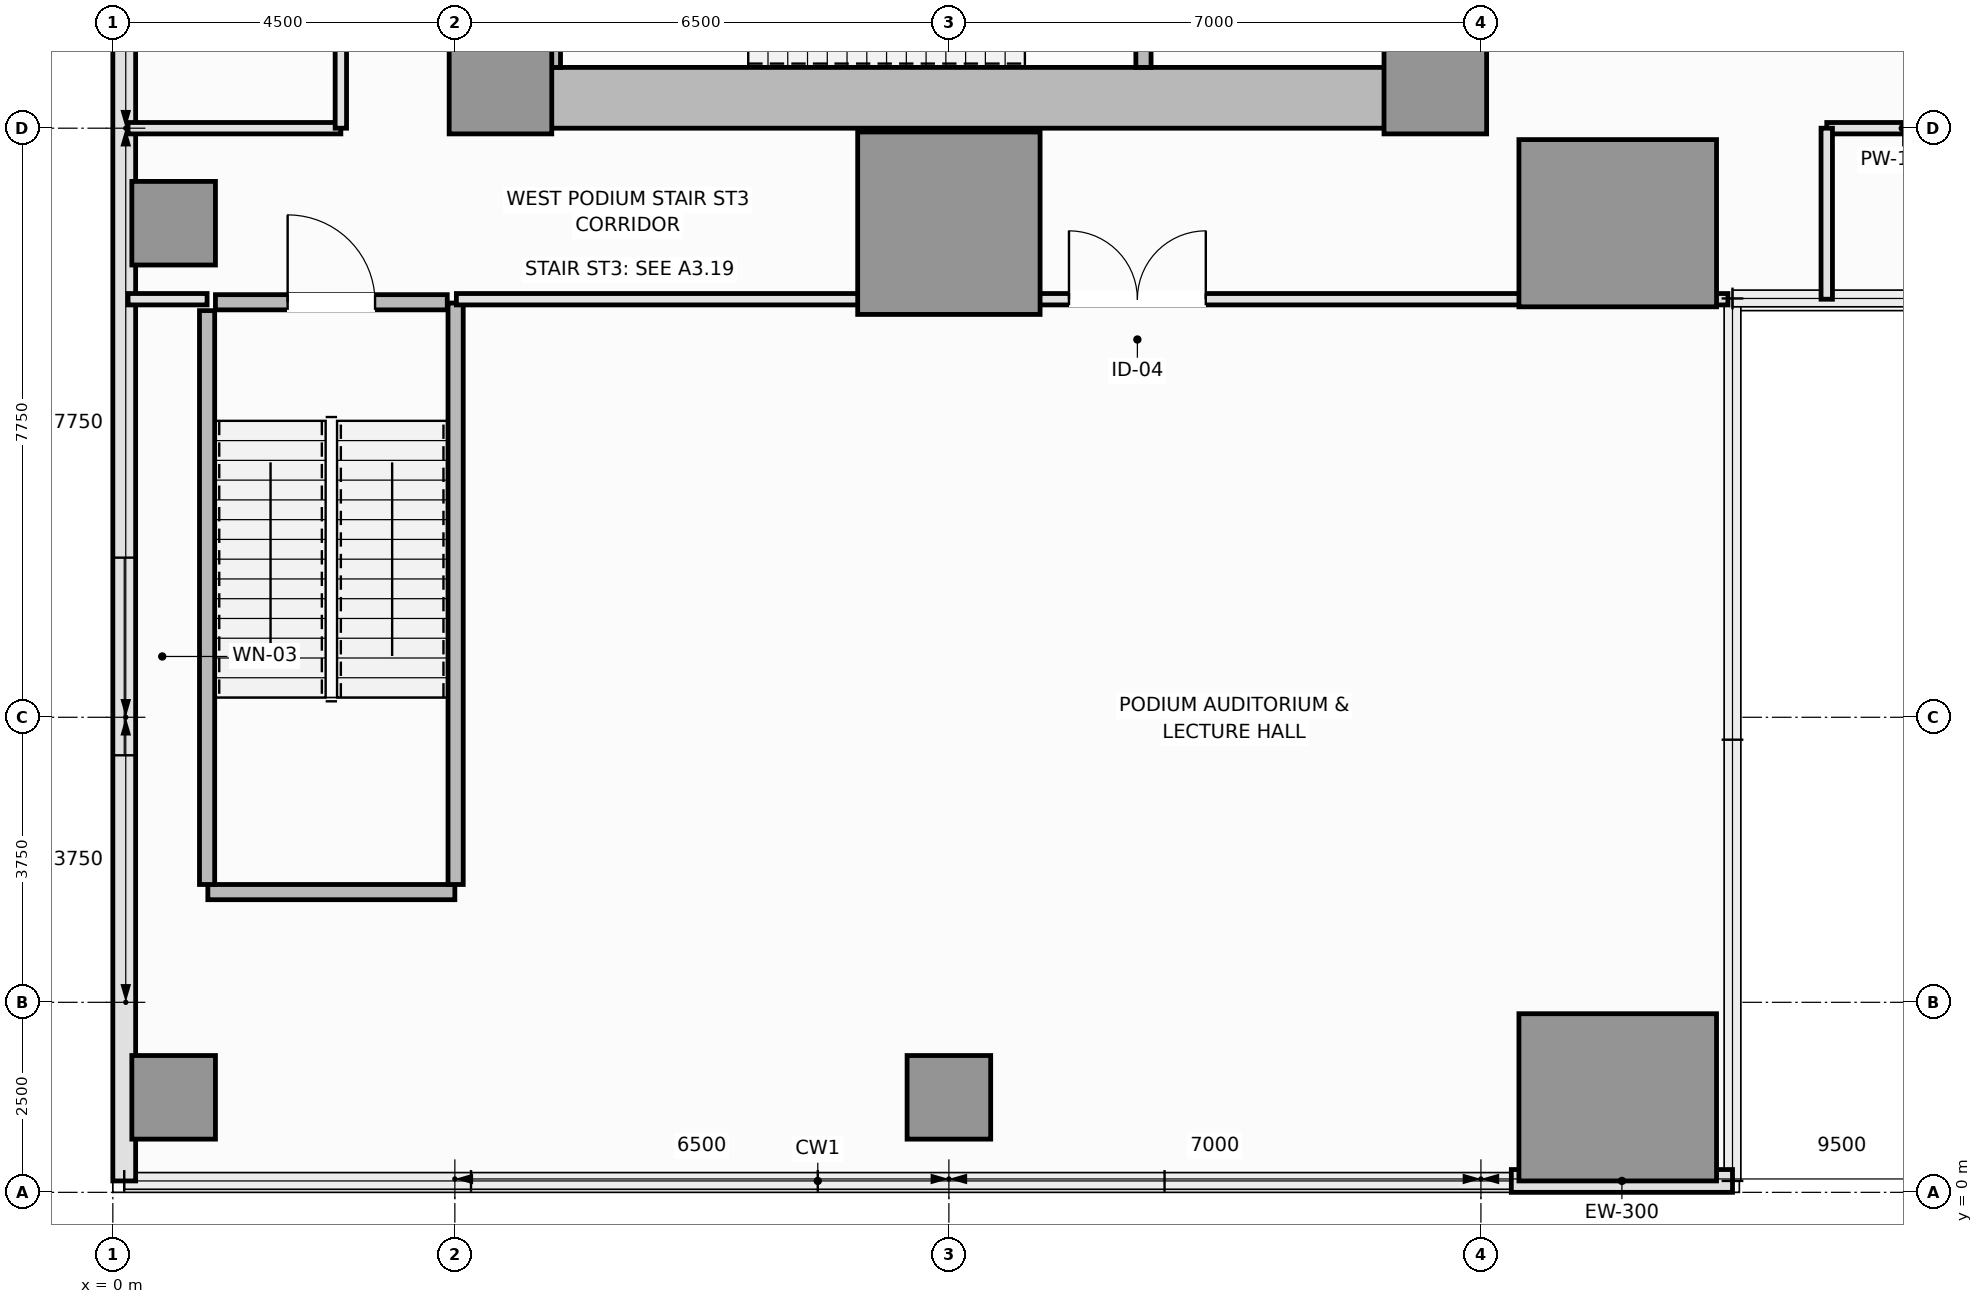
"""IFC4 building model, lengths in metres.
Left out: names, types, materials, properties, quantities, classifications, styles, units other than length and angle.
Written with IfcOpenShell. Run it as: python <this file> out.ifc"""

import sys

from ifc_helpers import new_model, si_unit, direction, frame, frame_2d, origin, origin_2d, place, context, subcontext, project, spatial, rectangle, extrude, element, fill, save


model = new_model("IFC4")
c1 = context("Model", 3, precision=1e-05, world=origin(), true_north=direction((0.0, 1.0)))
c2 = subcontext(c1, "Body", "Model", "MODEL_VIEW")
j1 = project(units=[si_unit("LENGTHUNIT", "METRE"), si_unit("PLANEANGLEUNIT", "RADIAN")], contexts=[c1])
p1 = place(None, origin())
s1 = spatial("IfcSite", under=j1, at=p1, CompositionType="ELEMENT")
p2 = place(p1, origin())
s2 = spatial("IfcBuilding", under=s1, at=p2, CompositionType="ELEMENT")
p3 = place(p2, frame((0.0, 0.0, 10.8)))
s3 = spatial("IfcBuildingStorey", under=s2, at=p3, CompositionType="ELEMENT", Elevation=10.8)
p4 = place(p3, frame((4.5, 14.4, 0.0), z_axis=(0.0, 0.0, 1.0), x_axis=(1.0, 0.0, 0.0)))
e1 = element("IfcWall", 1, at=p4, inside=s3, PredefinedType="SHEAR", context=c2, shape_type="SweptSolid", body=[
    extrude(rectangle(XDim=13.5, YDim=0.8, at=frame_2d((6.75, 0.0))), origin(), (0.0, 0.0, 1.0), 4.8),
])
p5 = place(p3, frame((4.9, 14.8, 0.0), z_axis=(0.0, 0.0, 1.0), x_axis=(0.0, 1.0, 0.0)))
e2 = element("IfcWall", 2, at=p5, inside=s3, PredefinedType="SHEAR", context=c2, shape_type="SweptSolid", body=[
    extrude(rectangle(XDim=20.9, YDim=0.8, at=frame_2d((10.45, 0.0))), origin(), (0.0, 0.0, 1.0), 4.8),
])
p6 = place(p3, frame((17.6, 14.8, 0.0), z_axis=(0.0, 0.0, 1.0), x_axis=(0.0, 1.0, 0.0)))
e3 = element("IfcWall", 3, at=p6, inside=s3, PredefinedType="SHEAR", context=c2, shape_type="SweptSolid", body=[
    extrude(rectangle(XDim=8.65, YDim=0.8, at=frame_2d((4.325, 0.0))), origin(), (0.0, 0.0, 1.0), 4.8),
])
p7 = place(p6, frame((4.1, 0.0, 0.0)))
e4 = element("IfcOpeningElement", 4, at=p7, cuts=e3, PredefinedType="OPENING", context=c2, shape_type="SweptSolid", body=[
    extrude(rectangle(XDim=1.1, YDim=2.15, at=frame_2d((0.55, 1.075))), frame((0.0, 0.41, 0.0), z_axis=(0.0, -1.0, 0.0), x_axis=(1.0, 0.0, 0.0)), (0.0, 0.0, 1.0), 0.82),
])
for number, where, z_axis, x_axis in (
    (5, (5.1, 14.6, 0.0), (0.0, 0.0, 1.0), (1.0, 0.0, 0.0)),
    (6, (17.4, 14.6, 0.0), (0.0, 0.0, 1.0), (1.0, 0.0, 0.0)),
):
    element("IfcColumn", number, at=place(p3, frame(where, z_axis=z_axis, x_axis=x_axis)), inside=s3, PredefinedType="PILASTER", context=c2, shape_type="SweptSolid", body=[
        extrude(rectangle(XDim=1.35, YDim=1.35, at=origin_2d()), origin(), (0.0, 0.0, 1.0), 4.8),
    ])
p8 = place(p3, frame((11.0, 12.75, 0.0), z_axis=(0.0, 0.0, 1.0), x_axis=(1.0, 0.0, 0.0)))
e7 = element("IfcColumn", 7, at=p8, inside=s3, PredefinedType="COLUMN", context=c2, shape_type="SweptSolid", body=[
    extrude(rectangle(XDim=2.4, YDim=2.4, at=origin_2d()), origin(), (0.0, 0.0, 1.0), 4.8),
])
for number, where, z_axis, x_axis in (
    (8, (19.8, 1.25, 0.0), (0.0, 0.0, 1.0), (1.0, 0.0, 0.0)),
    (9, (19.8, 12.75, 0.0), (0.0, 0.0, 1.0), (1.0, 0.0, 0.0)),
):
    element("IfcColumn", number, at=place(p3, frame(where, z_axis=z_axis, x_axis=x_axis)), inside=s3, PredefinedType="COLUMN", context=c2, shape_type="SweptSolid", body=[
        extrude(rectangle(XDim=2.6, YDim=2.2, at=origin_2d()), origin(), (0.0, 0.0, 1.0), 4.8),
    ])
for number, where, z_axis, x_axis in (
    (10, (0.8, 1.25, 0.0), (0.0, 0.0, 1.0), (1.0, 0.0, 0.0)),
    (11, (0.8, 12.75, 0.0), (0.0, 0.0, 1.0), (1.0, 0.0, 0.0)),
    (12, (11.0, 1.25, 0.0), (0.0, 0.0, 1.0), (1.0, 0.0, 0.0)),
):
    element("IfcColumn", number, at=place(p3, frame(where, z_axis=z_axis, x_axis=x_axis)), inside=s3, PredefinedType="COLUMN", context=c2, shape_type="SweptSolid", body=[
        extrude(rectangle(XDim=1.1, YDim=1.1, at=origin_2d()), origin(), (0.0, 0.0, 1.0), 4.8),
    ])
p9 = place(p3, frame((0.15, 50.35, 0.0), z_axis=(0.0, 0.0, 1.0), x_axis=(0.0, -1.0, 0.0)))
e13 = element("IfcWall", 13, at=p9, inside=s3, PredefinedType="SOLIDWALL", context=c2, shape_type="SweptSolid", body=[
    extrude(rectangle(XDim=50.2, YDim=0.3, at=frame_2d((25.1, 0.0))), origin(), (0.0, 0.0, 1.0), 4.6),
])
p10 = place(p9, frame((6.5, 0.0, 0.9)))
e14 = element("IfcOpeningElement", 14, at=p10, cuts=e13, PredefinedType="OPENING", context=c2, shape_type="SweptSolid", body=[
    extrude(rectangle(XDim=2.6, YDim=2.2, at=frame_2d((1.3, 1.1))), frame((0.0, 0.16, 0.0), z_axis=(0.0, -1.0, 0.0), x_axis=(1.0, 0.0, 0.0)), (0.0, 0.0, 1.0), 0.32),
])
p11 = place(p9, frame((42.0, 0.0, 0.9)))
e15 = element("IfcOpeningElement", 15, at=p11, cuts=e13, PredefinedType="OPENING", context=c2, shape_type="SweptSolid", body=[
    extrude(rectangle(XDim=2.6, YDim=2.2, at=frame_2d((1.3, 1.1))), frame((0.0, 0.16, 0.0), z_axis=(0.0, -1.0, 0.0), x_axis=(1.0, 0.0, 0.0)), (0.0, 0.0, 1.0), 0.32),
])
p12 = place(p3, frame((18.4, 0.15, 0.0), z_axis=(0.0, 0.0, 1.0), x_axis=(1.0, 0.0, 0.0)))
e16 = element("IfcWall", 16, at=p12, inside=s3, PredefinedType="SOLIDWALL", context=c2, shape_type="SweptSolid", body=[
    extrude(rectangle(XDim=2.91, YDim=0.3, at=frame_2d((1.455, 0.0))), origin(), (0.0, 0.0, 1.0), 4.6),
])
p13 = place(p3, frame((5.79, 14.8, 0.0), z_axis=(0.0, 0.0, 1.0), x_axis=(0.0, 1.0, 0.0)))
e17 = element("IfcWall", 17, at=p13, inside=s3, PredefinedType="SOLIDWALL", context=c2, shape_type="SweptSolid", body=[
    extrude(rectangle(XDim=3.05, YDim=0.2, at=frame_2d((1.525, 0.0))), origin(), (0.0, 0.0, 1.0), 4.8),
])
p14 = place(p3, frame((13.56, 14.8, 0.0), z_axis=(0.0, 0.0, 1.0), x_axis=(0.0, 1.0, 0.0)))
e18 = element("IfcWall", 18, at=p14, inside=s3, PredefinedType="SOLIDWALL", context=c2, shape_type="SweptSolid", body=[
    extrude(rectangle(XDim=3.05, YDim=0.2, at=frame_2d((1.525, 0.0))), origin(), (0.0, 0.0, 1.0), 4.8),
])
p15 = place(p14, frame((0.95, 0.0, 0.0)))
e19 = element("IfcOpeningElement", 19, at=p15, cuts=e18, PredefinedType="OPENING", context=c2, shape_type="SweptSolid", body=[
    extrude(rectangle(XDim=1.15, YDim=2.15, at=frame_2d((0.575, 1.075))), frame((0.0, 0.11, 0.0), z_axis=(0.0, -1.0, 0.0), x_axis=(1.0, 0.0, 0.0)), (0.0, 0.0, 1.0), 0.22),
])
p16 = place(p3, frame((1.25, 3.95, 0.0), z_axis=(0.0, 0.0, 1.0), x_axis=(1.0, 0.0, 0.0)))
e20 = element("IfcWall", 20, at=p16, inside=s3, PredefinedType="SOLIDWALL", context=c2, shape_type="SweptSolid", body=[
    extrude(rectangle(XDim=3.25, YDim=0.2, at=frame_2d((1.625, 0.0))), origin(), (0.0, 0.0, 1.0), 4.8),
])
p17 = place(p3, frame((1.24, 4.05, 0.0), z_axis=(0.0, 0.0, 1.0), x_axis=(0.0, 1.0, 0.0)))
e21 = element("IfcWall", 21, at=p17, inside=s3, PredefinedType="SOLIDWALL", context=c2, shape_type="SweptSolid", body=[
    extrude(rectangle(XDim=7.55, YDim=0.2, at=frame_2d((3.775, 0.0))), origin(), (0.0, 0.0, 1.0), 4.8),
])
p18 = place(p3, frame((4.51, 4.05, 0.0), z_axis=(0.0, 0.0, 1.0), x_axis=(0.0, 1.0, 0.0)))
e22 = element("IfcWall", 22, at=p18, inside=s3, PredefinedType="SOLIDWALL", context=c2, shape_type="SweptSolid", body=[
    extrude(rectangle(XDim=7.65, YDim=0.2, at=frame_2d((3.825, 0.0))), origin(), (0.0, 0.0, 1.0), 4.8),
])
p19 = place(p3, frame((1.35, 11.71, 0.0), z_axis=(0.0, 0.0, 1.0), x_axis=(1.0, 0.0, 0.0)))
e23 = element("IfcWall", 23, at=p19, inside=s3, PredefinedType="SOLIDWALL", context=c2, shape_type="SweptSolid", body=[
    extrude(rectangle(XDim=3.05, YDim=0.2, at=frame_2d((1.525, 0.0))), origin(), (0.0, 0.0, 1.0), 4.8),
])
p20 = place(p19, frame((0.95, 0.0, 0.0)))
e24 = element("IfcOpeningElement", 24, at=p20, cuts=e23, PredefinedType="OPENING", context=c2, shape_type="SweptSolid", body=[
    extrude(rectangle(XDim=1.15, YDim=2.15, at=frame_2d((0.575, 1.075))), frame((0.0, 0.11, 0.0), z_axis=(0.0, -1.0, 0.0), x_axis=(1.0, 0.0, 0.0)), (0.0, 0.0, 1.0), 0.22),
])
p21 = place(p3, frame((22.55, 14.0, 0.0), z_axis=(0.0, 0.0, 1.0), x_axis=(1.0, 0.0, 0.0)))
e25 = element("IfcWall", 25, at=p21, inside=s3, PredefinedType="PARTITIONING", context=c2, shape_type="SweptSolid", body=[
    extrude(rectangle(XDim=2.0, YDim=0.15, at=frame_2d((1.0, 0.0))), origin(), (0.0, 0.0, 1.0), 4.6),
])
p22 = place(p3, frame((0.2, 11.75, 0.0), z_axis=(0.0, 0.0, 1.0), x_axis=(1.0, 0.0, 0.0)))
e26 = element("IfcWall", 26, at=p22, inside=s3, PredefinedType="PARTITIONING", context=c2, shape_type="SweptSolid", body=[
    extrude(rectangle(XDim=1.04, YDim=0.15, at=frame_2d((0.52, 0.0))), origin(), (0.0, 0.0, 1.0), 4.6),
])
p23 = place(p3, frame((4.52, 11.75, 0.0), z_axis=(0.0, 0.0, 1.0), x_axis=(1.0, 0.0, 0.0)))
e27 = element("IfcWall", 27, at=p23, inside=s3, PredefinedType="PARTITIONING", context=c2, shape_type="SweptSolid", body=[
    extrude(rectangle(XDim=16.73, YDim=0.15, at=frame_2d((8.365, 0.0))), origin(), (0.0, 0.0, 1.0), 4.6),
])
p24 = place(p23, frame((8.06, 0.0, 0.0)))
e28 = element("IfcOpeningElement", 28, at=p24, cuts=e27, PredefinedType="OPENING", context=c2, shape_type="SweptSolid", body=[
    extrude(rectangle(XDim=1.8, YDim=2.2, at=frame_2d((0.9, 1.1))), frame((0.0, 0.085, 0.0), z_axis=(0.0, -1.0, 0.0), x_axis=(1.0, 0.0, 0.0)), (0.0, 0.0, 1.0), 0.17),
])
p25 = place(p3, frame((0.2, 14.0, 0.0), z_axis=(0.0, 0.0, 1.0), x_axis=(1.0, 0.0, 0.0)))
e29 = element("IfcWall", 29, at=p25, inside=s3, PredefinedType="PARTITIONING", context=c2, shape_type="SweptSolid", body=[
    extrude(rectangle(XDim=2.8, YDim=0.15, at=frame_2d((1.4, 0.0))), origin(), (0.0, 0.0, 1.0), 4.6),
])
p26 = place(p3, frame((22.55, 11.75, 0.0), z_axis=(0.0, 0.0, 1.0), x_axis=(0.0, 1.0, 0.0)))
e30 = element("IfcWall", 30, at=p26, inside=s3, PredefinedType="PARTITIONING", context=c2, shape_type="SweptSolid", body=[
    extrude(rectangle(XDim=2.25, YDim=0.15, at=frame_2d((1.125, 0.0))), origin(), (0.0, 0.0, 1.0), 4.6),
])
p27 = place(p3, frame((3.0, 14.0, 0.0), z_axis=(0.0, 0.0, 1.0), x_axis=(0.0, 1.0, 0.0)))
e31 = element("IfcWall", 31, at=p27, inside=s3, PredefinedType="PARTITIONING", context=c2, shape_type="SweptSolid", body=[
    extrude(rectangle(XDim=11.25, YDim=0.15, at=frame_2d((5.625, 0.0))), origin(), (0.0, 0.0, 1.0), 4.6),
])
p28 = place(p27, frame((5.125, 0.0, 0.0)))
e32 = element("IfcOpeningElement", 32, at=p28, cuts=e31, PredefinedType="OPENING", context=c2, shape_type="SweptSolid", body=[
    extrude(rectangle(XDim=1.0, YDim=2.15, at=frame_2d((0.5, 1.075))), frame((0.0, 0.085, 0.0), z_axis=(0.0, -1.0, 0.0), x_axis=(1.0, 0.0, 0.0)), (0.0, 0.0, 1.0), 0.17),
])
p29 = place(p11, origin())
e33 = element("IfcWindow", 33, at=p29, inside=s3, PartitioningType="SINGLE_PANEL", PredefinedType="WINDOW", context=c2, shape_type="SweptSolid", body=[
    extrude(rectangle(XDim=2.6, YDim=2.2, at=frame_2d((1.3, 1.1))), frame((0.0, 0.03, 0.0), z_axis=(0.0, -1.0, 0.0), x_axis=(1.0, 0.0, 0.0)), (0.0, 0.0, 1.0), 0.06),
])
fill(e15, e33)
p30 = place(p20, origin())
e34 = element("IfcDoor", 34, at=p30, inside=s3, OperationType="SINGLE_SWING_LEFT", PredefinedType="DOOR", context=c2, shape_type="SweptSolid", body=[
    extrude(rectangle(XDim=1.15, YDim=2.15, at=frame_2d((0.575, 1.075))), frame((0.0, 0.025, 0.0), z_axis=(0.0, -1.0, 0.0), x_axis=(1.0, 0.0, 0.0)), (0.0, 0.0, 1.0), 0.05),
])
fill(e24, e34)
p31 = place(p24, origin())
e35 = element("IfcDoor", 35, at=p31, inside=s3, OperationType="DOUBLE_DOOR_SINGLE_SWING", PredefinedType="DOOR", context=c2, shape_type="SweptSolid", body=[
    extrude(rectangle(XDim=1.8, YDim=2.2, at=frame_2d((0.9, 1.1))), frame((0.0, 0.025, 0.0), z_axis=(0.0, -1.0, 0.0), x_axis=(1.0, 0.0, 0.0)), (0.0, 0.0, 1.0), 0.05),
])
fill(e28, e35)
save(model, sys.argv[1])
